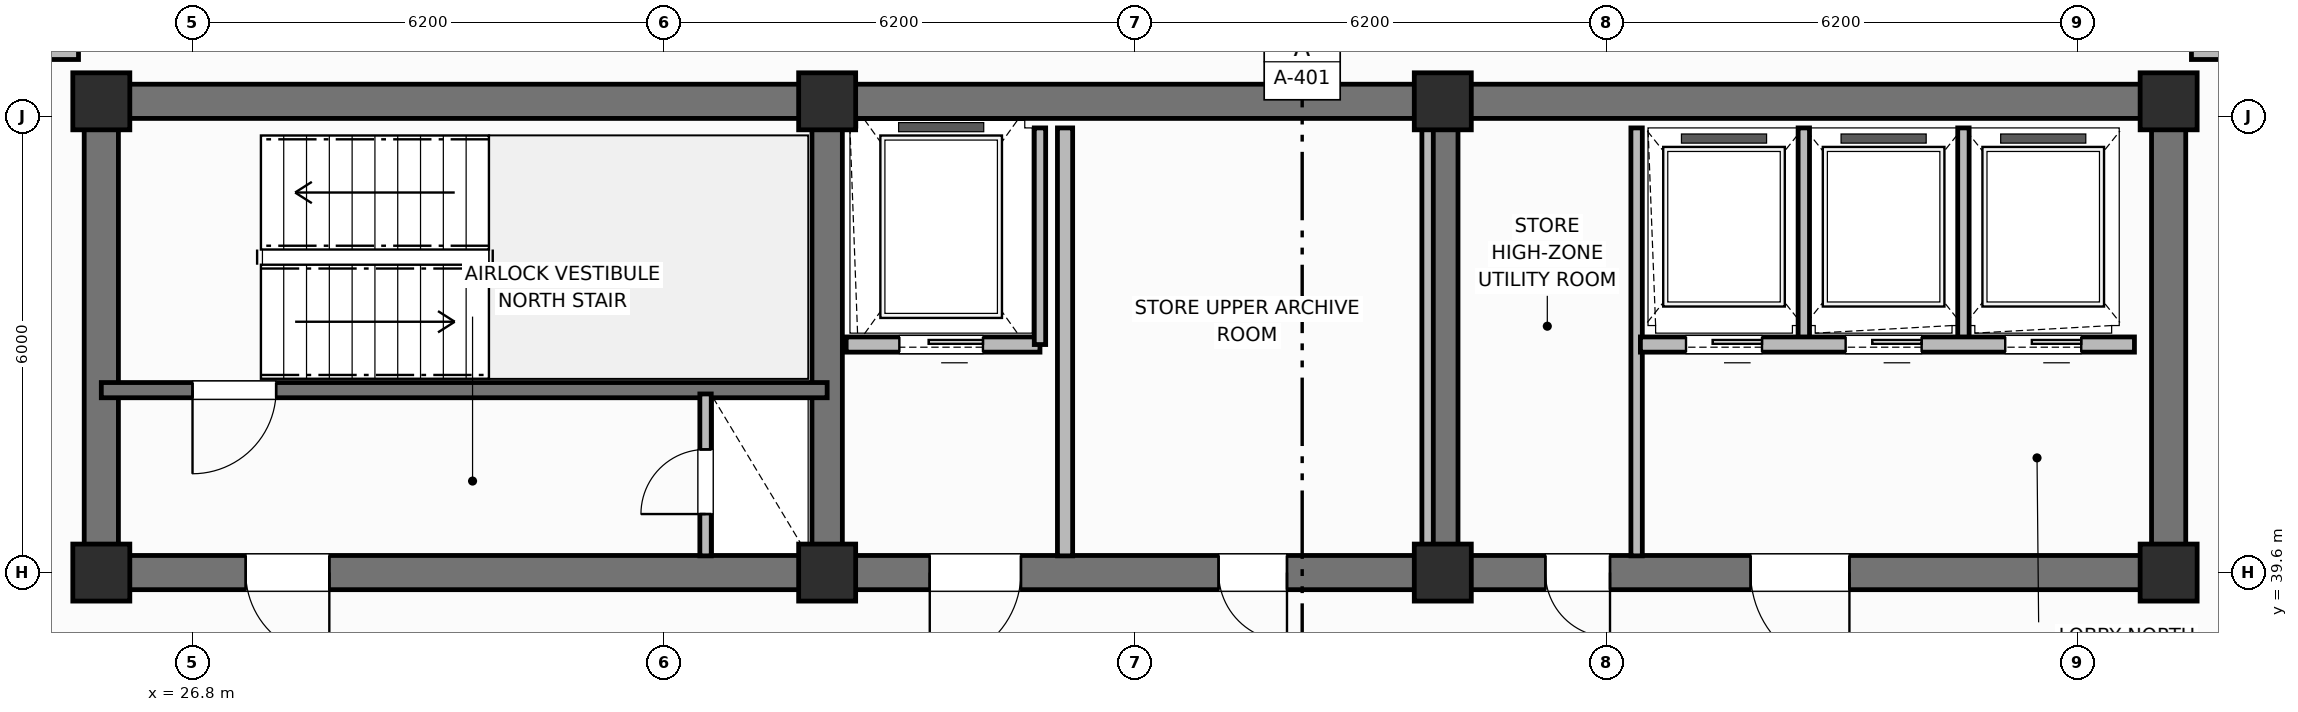
"""IFC4 building model, lengths in metres.
Left out: names, types, materials, properties, quantities, classifications, styles, units other than length and angle.
Written with IfcOpenShell. Run it as: python <this file> out.ifc"""

import sys

from ifc_helpers import new_model, si_unit, direction, frame, frame_2d, origin, origin_2d, place, context, subcontext, project, spatial, rectangle, extrude, element, fill, save


model = new_model("IFC4")
c1 = context("Model", 3, precision=1e-05, world=origin(), true_north=direction((0.0, 1.0)))
c2 = subcontext(c1, "Body", "Model", "MODEL_VIEW")
j1 = project(units=[si_unit("LENGTHUNIT", "METRE"), si_unit("PLANEANGLEUNIT", "RADIAN")], contexts=[c1])
p1 = place(None, origin())
s1 = spatial("IfcSite", under=j1, at=p1, CompositionType="ELEMENT")
p2 = place(p1, origin())
s2 = spatial("IfcBuilding", under=s1, at=p2, CompositionType="ELEMENT")
p3 = place(p2, frame((0.0, 0.0, 263.9)))
s3 = spatial("IfcBuildingStorey", under=s2, at=p3, CompositionType="ELEMENT", Elevation=263.9)
p4 = place(p3, frame((25.6, 45.8, 0.0), z_axis=(0.0, 0.0, 1.0), x_axis=(1.0, 0.0, 0.0)))
e1 = element("IfcWall", 1, at=p4, inside=s3, PredefinedType="SHEAR", context=c2, shape_type="SweptSolid", body=[
    extrude(rectangle(XDim=27.2, YDim=0.45, at=frame_2d((13.6, 0.0))), origin(), (0.0, 0.0, 1.0), 3.7),
])
for number, where, z_axis, x_axis in (
    (2, (25.6, 39.825, 0.0), (0.0, 0.0, 1.0), (0.0, 1.0, 0.0)),
    (3, (52.8, 39.825, 0.0), (0.0, 0.0, 1.0), (0.0, 1.0, 0.0)),
):
    element("IfcWall", number, at=place(p3, frame(where, z_axis=z_axis, x_axis=x_axis)), inside=s3, PredefinedType="SHEAR", context=c2, shape_type="SweptSolid", body=[
        extrude(rectangle(XDim=5.75, YDim=0.45, at=frame_2d((2.875, 0.0))), origin(), (0.0, 0.0, 1.0), 3.7),
    ])
p5 = place(p3, frame((52.8, 39.6, 0.0), z_axis=(0.0, 0.0, 1.0), x_axis=(-1.0, 0.0, 0.0)))
e4 = element("IfcWall", 4, at=p5, inside=s3, PredefinedType="SHEAR", context=c2, shape_type="SweptSolid", body=[
    extrude(rectangle(XDim=27.2, YDim=0.45, at=frame_2d((13.6, 0.0))), origin(), (0.0, 0.0, 1.0), 3.7),
])
p6 = place(p5, frame((24.2, 0.0, 0.0)))
e5 = element("IfcOpeningElement", 5, at=p6, cuts=e4, PredefinedType="OPENING", context=c2, shape_type="SweptSolid", body=[
    extrude(rectangle(XDim=1.1, YDim=2.15, at=frame_2d((0.55, 1.075))), frame((0.0, 0.235, 0.0), z_axis=(0.0, -1.0, 0.0), x_axis=(1.0, 0.0, 0.0)), (0.0, 0.0, 1.0), 0.47),
])
p7 = place(p5, frame((15.1, 0.0, 0.0)))
e6 = element("IfcOpeningElement", 6, at=p7, cuts=e4, PredefinedType="OPENING", context=c2, shape_type="SweptSolid", body=[
    extrude(rectangle(XDim=1.2, YDim=2.15, at=frame_2d((0.6, 1.075))), frame((0.0, 0.235, 0.0), z_axis=(0.0, -1.0, 0.0), x_axis=(1.0, 0.0, 0.0)), (0.0, 0.0, 1.0), 0.47),
])
p8 = place(p5, frame((11.6, 0.0, 0.0)))
e7 = element("IfcOpeningElement", 7, at=p8, cuts=e4, PredefinedType="OPENING", context=c2, shape_type="SweptSolid", body=[
    extrude(rectangle(XDim=0.9, YDim=2.1, at=frame_2d((0.45, 1.05))), frame((0.0, 0.235, 0.0), z_axis=(0.0, -1.0, 0.0), x_axis=(1.0, 0.0, 0.0)), (0.0, 0.0, 1.0), 0.47),
])
p9 = place(p5, frame((7.35, 0.0, 0.0)))
e8 = element("IfcOpeningElement", 8, at=p9, cuts=e4, PredefinedType="OPENING", context=c2, shape_type="SweptSolid", body=[
    extrude(rectangle(XDim=0.85, YDim=2.1, at=frame_2d((0.425, 1.05))), frame((0.0, 0.235, 0.0), z_axis=(0.0, -1.0, 0.0), x_axis=(1.0, 0.0, 0.0)), (0.0, 0.0, 1.0), 0.47),
])
p10 = place(p5, frame((4.2, 0.0, 0.0)))
e9 = element("IfcOpeningElement", 9, at=p10, cuts=e4, PredefinedType="OPENING", context=c2, shape_type="SweptSolid", body=[
    extrude(rectangle(XDim=1.3, YDim=2.2, at=frame_2d((0.65, 1.1))), frame((0.0, 0.235, 0.0), z_axis=(0.0, -1.0, 0.0), x_axis=(1.0, 0.0, 0.0)), (0.0, 0.0, 1.0), 0.47),
])
for number, where, z_axis, x_axis in (
    (10, (35.15, 39.825, 0.0), (0.0, 0.0, 1.0), (0.0, 1.0, 0.0)),
    (11, (43.25, 39.825, 0.0), (0.0, 0.0, 1.0), (0.0, 1.0, 0.0)),
):
    element("IfcWall", number, at=place(p3, frame(where, z_axis=z_axis, x_axis=x_axis)), inside=s3, PredefinedType="SHEAR", context=c2, shape_type="SweptSolid", body=[
        extrude(rectangle(XDim=5.75, YDim=0.4, at=frame_2d((2.875, 0.0))), origin(), (0.0, 0.0, 1.0), 3.7),
    ])
for number, where, z_axis, x_axis in (
    (12, (25.6, 39.6, 0.0), (0.0, 0.0, 1.0), (1.0, 0.0, 0.0)),
    (13, (25.6, 45.8, 0.0), (0.0, 0.0, 1.0), (1.0, 0.0, 0.0)),
    (14, (35.15, 39.6, 0.0), (0.0, 0.0, 1.0), (1.0, 0.0, 0.0)),
    (15, (35.15, 45.8, 0.0), (0.0, 0.0, 1.0), (1.0, 0.0, 0.0)),
    (16, (43.25, 39.6, 0.0), (0.0, 0.0, 1.0), (1.0, 0.0, 0.0)),
    (17, (43.25, 45.8, 0.0), (0.0, 0.0, 1.0), (1.0, 0.0, 0.0)),
    (18, (52.8, 39.6, 0.0), (0.0, 0.0, 1.0), (1.0, 0.0, 0.0)),
    (19, (52.8, 45.8, 0.0), (0.0, 0.0, 1.0), (1.0, 0.0, 0.0)),
):
    element("IfcColumn", number, at=place(p3, frame(where, z_axis=z_axis, x_axis=x_axis)), inside=s3, PredefinedType="COLUMN", context=c2, shape_type="SweptSolid", body=[
        extrude(rectangle(XDim=0.75, YDim=0.75, at=origin_2d()), origin(), (0.0, 0.0, 1.0), 3.7),
    ])
p11 = place(p3, frame((35.15, 42.0, 0.0), z_axis=(0.0, 0.0, 1.0), x_axis=(-1.0, 0.0, 0.0)))
e20 = element("IfcWall", 20, at=p11, inside=s3, PredefinedType="SHEAR", context=c2, shape_type="SweptSolid", body=[
    extrude(rectangle(XDim=9.55, YDim=0.2, at=frame_2d((4.775, 0.0))), origin(), (0.0, 0.0, 1.0), 3.7),
])
p12 = place(p11, frame((7.25, 0.0, 0.0)))
e21 = element("IfcOpeningElement", 21, at=p12, cuts=e20, PredefinedType="OPENING", context=c2, shape_type="SweptSolid", body=[
    extrude(rectangle(XDim=1.1, YDim=2.15, at=frame_2d((0.55, 1.075))), frame((0.0, 0.11, 0.0), z_axis=(0.0, -1.0, 0.0), x_axis=(1.0, 0.0, 0.0)), (0.0, 0.0, 1.0), 0.22),
])
p13 = place(p3, frame((33.55, 39.82, 0.0), z_axis=(0.0, 0.0, 1.0), x_axis=(0.0, 1.0, 0.0)))
e22 = element("IfcWall", 22, at=p13, inside=s3, PredefinedType="PARTITIONING", context=c2, shape_type="SweptSolid", body=[
    extrude(rectangle(XDim=2.13, YDim=0.15, at=frame_2d((1.065, 0.0))), origin(), (0.0, 0.0, 1.0), 2.56),
])
p14 = place(p13, frame((0.55, 0.0, 0.0)))
e23 = element("IfcOpeningElement", 23, at=p14, cuts=e22, PredefinedType="OPENING", context=c2, shape_type="SweptSolid", body=[
    extrude(rectangle(XDim=0.85, YDim=2.05, at=frame_2d((0.425, 1.025))), frame((0.0, 0.085, 0.0), z_axis=(0.0, -1.0, 0.0), x_axis=(1.0, 0.0, 0.0)), (0.0, 0.0, 1.0), 0.17),
])
p15 = place(p3, frame((37.95, 42.6, 0.0), z_axis=(0.0, 0.0, 1.0), x_axis=(-1.0, 0.0, 0.0)))
e24 = element("IfcWall", 24, at=p15, inside=s3, PredefinedType="PARTITIONING", context=c2, shape_type="SweptSolid", body=[
    extrude(rectangle(XDim=2.55, YDim=0.2, at=frame_2d((1.275, 0.0))), origin(), (0.0, 0.0, 1.0), 2.33),
])
p16 = place(p15, frame((0.75, 0.0, 0.0)))
e25 = element("IfcOpeningElement", 25, at=p16, cuts=e24, PredefinedType="OPENING", context=c2, shape_type="SweptSolid", body=[
    extrude(rectangle(XDim=1.1, YDim=2.15, at=frame_2d((0.55, 1.075))), frame((0.0, 0.11, 0.0), z_axis=(0.0, -1.0, 0.0), x_axis=(1.0, 0.0, 0.0)), (0.0, 0.0, 1.0), 0.22),
])
p17 = place(p3, frame((37.95, 42.6, 0.0), z_axis=(0.0, 0.0, 1.0), x_axis=(0.0, 1.0, 0.0)))
e26 = element("IfcWall", 26, at=p17, inside=s3, PredefinedType="PARTITIONING", context=c2, shape_type="SweptSolid", body=[
    extrude(rectangle(XDim=2.85, YDim=0.15, at=frame_2d((1.425, 0.0))), origin(), (0.0, 0.0, 1.0), 2.56),
])
p18 = place(p3, frame((38.28, 39.82, 0.0), z_axis=(0.0, 0.0, 1.0), x_axis=(0.0, 1.0, 0.0)))
e27 = element("IfcWall", 27, at=p18, inside=s3, PredefinedType="PARTITIONING", context=c2, shape_type="SweptSolid", body=[
    extrude(rectangle(XDim=5.63, YDim=0.2, at=frame_2d((2.815, 0.0))), origin(), (0.0, 0.0, 1.0), 2.56),
])
for number, where, z_axis, x_axis in (
    (28, (43.05, 39.82, 0.0), (0.0, 0.0, 1.0), (0.0, 1.0, 0.0)),
    (29, (45.8, 39.82, 0.0), (0.0, 0.0, 1.0), (0.0, 1.0, 0.0)),
):
    element("IfcWall", number, at=place(p3, frame(where, z_axis=z_axis, x_axis=x_axis)), inside=s3, PredefinedType="PARTITIONING", context=c2, shape_type="SweptSolid", body=[
        extrude(rectangle(XDim=5.63, YDim=0.15, at=frame_2d((2.815, 0.0))), origin(), (0.0, 0.0, 1.0), 2.56),
    ])
for number, where, z_axis, x_axis in (
    (30, (48.0, 42.65, 0.0), (0.0, 0.0, 1.0), (0.0, 1.0, 0.0)),
    (31, (50.1, 42.65, 0.0), (0.0, 0.0, 1.0), (0.0, 1.0, 0.0)),
):
    element("IfcWall", number, at=place(p3, frame(where, z_axis=z_axis, x_axis=x_axis)), inside=s3, PredefinedType="PARTITIONING", context=c2, shape_type="SweptSolid", body=[
        extrude(rectangle(XDim=2.8, YDim=0.15, at=frame_2d((1.4, 0.0))), origin(), (0.0, 0.0, 1.0), 2.56),
    ])
p19 = place(p3, frame((52.35, 42.6, 0.0), z_axis=(0.0, 0.0, 1.0), x_axis=(-1.0, 0.0, 0.0)))
e32 = element("IfcWall", 32, at=p19, inside=s3, PredefinedType="PARTITIONING", context=c2, shape_type="SweptSolid", body=[
    extrude(rectangle(XDim=6.5, YDim=0.2, at=frame_2d((3.25, 0.0))), origin(), (0.0, 0.0, 1.0), 2.56),
])
p20 = place(p19, frame((4.9, 0.0, 0.0)))
e33 = element("IfcOpeningElement", 33, at=p20, cuts=e32, PredefinedType="OPENING", context=c2, shape_type="SweptSolid", body=[
    extrude(rectangle(XDim=1.0, YDim=2.15, at=frame_2d((0.5, 1.075))), frame((0.0, 0.11, 0.0), z_axis=(0.0, -1.0, 0.0), x_axis=(1.0, 0.0, 0.0)), (0.0, 0.0, 1.0), 0.22),
])
p21 = place(p19, frame((2.8, 0.0, 0.0)))
e34 = element("IfcOpeningElement", 34, at=p21, cuts=e32, PredefinedType="OPENING", context=c2, shape_type="SweptSolid", body=[
    extrude(rectangle(XDim=1.0, YDim=2.15, at=frame_2d((0.5, 1.075))), frame((0.0, 0.11, 0.0), z_axis=(0.0, -1.0, 0.0), x_axis=(1.0, 0.0, 0.0)), (0.0, 0.0, 1.0), 0.22),
])
p22 = place(p19, frame((0.7, 0.0, 0.0)))
e35 = element("IfcOpeningElement", 35, at=p22, cuts=e32, PredefinedType="OPENING", context=c2, shape_type="SweptSolid", body=[
    extrude(rectangle(XDim=1.0, YDim=2.15, at=frame_2d((0.5, 1.075))), frame((0.0, 0.11, 0.0), z_axis=(0.0, -1.0, 0.0), x_axis=(1.0, 0.0, 0.0)), (0.0, 0.0, 1.0), 0.22),
])
p23 = place(p3, frame((21.546, 46.45, 0.0), z_axis=(0.0, 0.0, 1.0), x_axis=(1.0, 0.0, 0.0)))
e36 = element("IfcWall", 36, at=p23, inside=s3, PredefinedType="PARTITIONING", context=c2, shape_type="SweptSolid", body=[
    extrude(rectangle(XDim=3.754, YDim=0.2, at=frame_2d((1.877, 0.0))), origin(), (0.0, 0.0, 1.0), 2.56),
])
p24 = place(p3, frame((53.1, 46.45, 0.0), z_axis=(0.0, 0.0, 1.0), x_axis=(1.0, 0.0, 0.0)))
e37 = element("IfcWall", 37, at=p24, inside=s3, PredefinedType="PARTITIONING", context=c2, shape_type="SweptSolid", body=[
    extrude(rectangle(XDim=3.754, YDim=0.2, at=frame_2d((1.877, 0.0))), origin(), (0.0, 0.0, 1.0), 2.56),
])
p25 = place(p12, origin())
e38 = element("IfcDoor", 38, at=p25, inside=s3, OperationType="SINGLE_SWING_RIGHT", PredefinedType="DOOR", context=c2, shape_type="SweptSolid", body=[
    extrude(rectangle(XDim=1.1, YDim=2.15, at=frame_2d((0.55, 1.075))), frame((0.0, 0.025, 0.0), z_axis=(0.0, -1.0, 0.0), x_axis=(1.0, 0.0, 0.0)), (0.0, 0.0, 1.0), 0.05),
])
fill(e21, e38)
p26 = place(p14, origin())
e39 = element("IfcDoor", 39, at=p26, inside=s3, OperationType="SINGLE_SWING_LEFT", PredefinedType="TRAPDOOR", context=c2, shape_type="SweptSolid", body=[
    extrude(rectangle(XDim=0.85, YDim=2.05, at=frame_2d((0.425, 1.025))), frame((0.0, 0.025, 0.0), z_axis=(0.0, -1.0, 0.0), x_axis=(1.0, 0.0, 0.0)), (0.0, 0.0, 1.0), 0.05),
])
fill(e23, e39)
p27 = place(p16, origin())
e40 = element("IfcDoor", 40, at=p27, inside=s3, OperationType="SLIDING_TO_LEFT", PredefinedType="DOOR", context=c2, shape_type="SweptSolid", body=[
    extrude(rectangle(XDim=1.1, YDim=2.15, at=frame_2d((0.55, 1.075))), frame((0.0, 0.025, 0.0), z_axis=(0.0, -1.0, 0.0), x_axis=(1.0, 0.0, 0.0)), (0.0, 0.0, 1.0), 0.05),
])
fill(e25, e40)
p28 = place(p20, origin())
e41 = element("IfcDoor", 41, at=p28, inside=s3, OperationType="SLIDING_TO_LEFT", PredefinedType="DOOR", context=c2, shape_type="SweptSolid", body=[
    extrude(rectangle(XDim=1.0, YDim=2.15, at=frame_2d((0.5, 1.075))), frame((0.0, 0.025, 0.0), z_axis=(0.0, -1.0, 0.0), x_axis=(1.0, 0.0, 0.0)), (0.0, 0.0, 1.0), 0.05),
])
fill(e33, e41)
p29 = place(p21, origin())
e42 = element("IfcDoor", 42, at=p29, inside=s3, OperationType="SLIDING_TO_LEFT", PredefinedType="DOOR", context=c2, shape_type="SweptSolid", body=[
    extrude(rectangle(XDim=1.0, YDim=2.15, at=frame_2d((0.5, 1.075))), frame((0.0, 0.025, 0.0), z_axis=(0.0, -1.0, 0.0), x_axis=(1.0, 0.0, 0.0)), (0.0, 0.0, 1.0), 0.05),
])
fill(e34, e42)
p30 = place(p22, origin())
e43 = element("IfcDoor", 43, at=p30, inside=s3, OperationType="SLIDING_TO_LEFT", PredefinedType="DOOR", context=c2, shape_type="SweptSolid", body=[
    extrude(rectangle(XDim=1.0, YDim=2.15, at=frame_2d((0.5, 1.075))), frame((0.0, 0.025, 0.0), z_axis=(0.0, -1.0, 0.0), x_axis=(1.0, 0.0, 0.0)), (0.0, 0.0, 1.0), 0.05),
])
fill(e35, e43)
p31 = place(p6, origin())
e44 = element("IfcDoor", 44, at=p31, inside=s3, OperationType="SINGLE_SWING_LEFT", PredefinedType="DOOR", context=c2, shape_type="SweptSolid", body=[
    extrude(rectangle(XDim=1.1, YDim=2.15, at=frame_2d((0.55, 1.075))), frame((0.0, 0.025, 0.0), z_axis=(0.0, -1.0, 0.0), x_axis=(1.0, 0.0, 0.0)), (0.0, 0.0, 1.0), 0.05),
])
fill(e5, e44)
p32 = place(p7, origin())
e45 = element("IfcDoor", 45, at=p32, inside=s3, OperationType="SINGLE_SWING_RIGHT", PredefinedType="DOOR", context=c2, shape_type="SweptSolid", body=[
    extrude(rectangle(XDim=1.2, YDim=2.15, at=frame_2d((0.6, 1.075))), frame((0.0, 0.025, 0.0), z_axis=(0.0, -1.0, 0.0), x_axis=(1.0, 0.0, 0.0)), (0.0, 0.0, 1.0), 0.05),
])
fill(e6, e45)
p33 = place(p8, origin())
e46 = element("IfcDoor", 46, at=p33, inside=s3, OperationType="SINGLE_SWING_LEFT", PredefinedType="DOOR", context=c2, shape_type="SweptSolid", body=[
    extrude(rectangle(XDim=0.9, YDim=2.1, at=frame_2d((0.45, 1.05))), frame((0.0, 0.025, 0.0), z_axis=(0.0, -1.0, 0.0), x_axis=(1.0, 0.0, 0.0)), (0.0, 0.0, 1.0), 0.05),
])
fill(e7, e46)
p34 = place(p9, origin())
e47 = element("IfcDoor", 47, at=p34, inside=s3, OperationType="SINGLE_SWING_LEFT", PredefinedType="DOOR", context=c2, shape_type="SweptSolid", body=[
    extrude(rectangle(XDim=0.85, YDim=2.1, at=frame_2d((0.425, 1.05))), frame((0.0, 0.025, 0.0), z_axis=(0.0, -1.0, 0.0), x_axis=(1.0, 0.0, 0.0)), (0.0, 0.0, 1.0), 0.05),
])
fill(e8, e47)
p35 = place(p10, origin())
e48 = element("IfcDoor", 48, at=p35, inside=s3, OperationType="SINGLE_SWING_LEFT", PredefinedType="DOOR", context=c2, shape_type="SweptSolid", body=[
    extrude(rectangle(XDim=1.3, YDim=2.2, at=frame_2d((0.65, 1.1))), frame((0.0, 0.025, 0.0), z_axis=(0.0, -1.0, 0.0), x_axis=(1.0, 0.0, 0.0)), (0.0, 0.0, 1.0), 0.05),
])
fill(e9, e48)
save(model, sys.argv[1])
